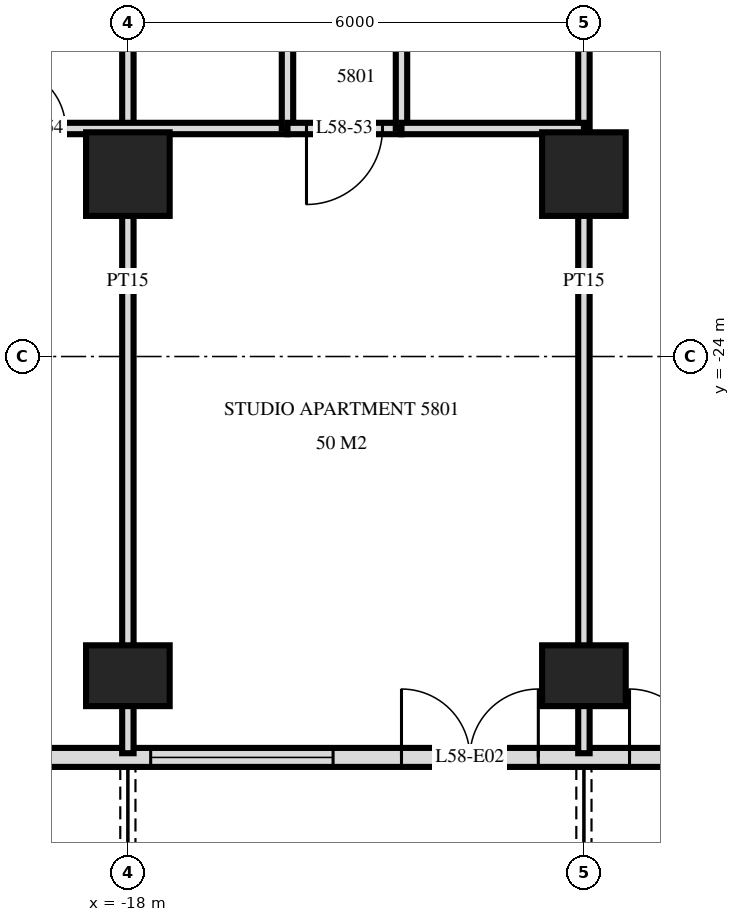
"""IFC4 building model, lengths in metres.
Left out: names, types, materials, properties, quantities, classifications, styles, units other than length and angle.
Written with IfcOpenShell. Run it as: python <this file> out.ifc"""

import sys

from ifc_helpers import new_model, si_unit, direction, frame, frame_2d, origin, origin_2d, place, context, subcontext, project, spatial, rectangle, extrude, element, fill, save


model = new_model("IFC4")
c1 = context("Model", 3, precision=1e-05, world=origin(), true_north=direction((0.0, 1.0)))
c2 = subcontext(c1, "Body", "Model", "MODEL_VIEW")
j1 = project(units=[si_unit("LENGTHUNIT", "METRE"), si_unit("PLANEANGLEUNIT", "RADIAN")], contexts=[c1])
p1 = place(None, origin())
s1 = spatial("IfcSite", under=j1, at=p1, CompositionType="ELEMENT")
p2 = place(p1, origin())
s2 = spatial("IfcBuilding", under=s1, at=p2, CompositionType="ELEMENT")
p3 = place(p2, frame((0.0, 0.0, 222.1)))
s3 = spatial("IfcBuildingStorey", under=s2, at=p3, CompositionType="ELEMENT", Elevation=222.1)
p4 = place(p3, frame((-18.0, -28.2, 0.0), z_axis=(0.0, 0.0, 1.0), x_axis=(1.0, 0.0, 0.0)))
e1 = element("IfcColumn", 1, at=p4, inside=s3, PredefinedType="COLUMN", context=c2, shape_type="SweptSolid", body=[
    extrude(rectangle(XDim=1.1, YDim=0.8, at=origin_2d()), origin(), (0.0, 0.0, 1.0), 3.5),
])
p5 = place(p3, frame((-18.0, -21.6, 0.0), z_axis=(0.0, 0.0, 1.0), x_axis=(1.0, 0.0, 0.0)))
e2 = element("IfcColumn", 2, at=p5, inside=s3, PredefinedType="COLUMN", context=c2, shape_type="SweptSolid", body=[
    extrude(rectangle(XDim=1.1, YDim=1.1, at=origin_2d()), origin(), (0.0, 0.0, 1.0), 3.5),
])
p6 = place(p3, frame((-12.0, -28.2, 0.0), z_axis=(0.0, 0.0, 1.0), x_axis=(1.0, 0.0, 0.0)))
e3 = element("IfcColumn", 3, at=p6, inside=s3, PredefinedType="COLUMN", context=c2, shape_type="SweptSolid", body=[
    extrude(rectangle(XDim=1.1, YDim=0.8, at=origin_2d()), origin(), (0.0, 0.0, 1.0), 3.5),
])
p7 = place(p3, frame((-12.0, -21.6, 0.0), z_axis=(0.0, 0.0, 1.0), x_axis=(1.0, 0.0, 0.0)))
e4 = element("IfcColumn", 4, at=p7, inside=s3, PredefinedType="COLUMN", context=c2, shape_type="SweptSolid", body=[
    extrude(rectangle(XDim=1.1, YDim=1.1, at=origin_2d()), origin(), (0.0, 0.0, 1.0), 3.5),
])
p8 = place(p3, frame((-22.475, -29.275, 0.0), z_axis=(0.0, 0.0, 1.0), x_axis=(1.0, 0.0, 0.0)))
e5 = element("IfcWall", 5, at=p8, inside=s3, PredefinedType="SOLIDWALL", context=c2, shape_type="SweptSolid", body=[
    extrude(rectangle(XDim=44.951, YDim=0.25, at=frame_2d((22.475, 0.0))), origin(), (0.0, 0.0, 1.0), 3.22),
])
p9 = place(p8, frame((0.575, 0.0, 0.0)))
e6 = element("IfcOpeningElement", 6, at=p9, cuts=e5, PredefinedType="OPENING", context=c2, shape_type="SweptSolid", body=[
    extrude(rectangle(XDim=1.8, YDim=2.4, at=frame_2d((0.9, 1.2))), frame((0.0, 0.135, 0.0), z_axis=(0.0, -1.0, 0.0), x_axis=(1.0, 0.0, 0.0)), (0.0, 0.0, 1.0), 0.27),
])
p10 = place(p8, frame((4.775, 0.0, 0.9)))
e7 = element("IfcOpeningElement", 7, at=p10, cuts=e5, PredefinedType="OPENING", context=c2, shape_type="SweptSolid", body=[
    extrude(rectangle(XDim=2.4, YDim=1.5, at=frame_2d((1.2, 0.75))), frame((0.0, 0.135, 0.0), z_axis=(0.0, -1.0, 0.0), x_axis=(1.0, 0.0, 0.0)), (0.0, 0.0, 1.0), 0.27),
])
p11 = place(p8, frame((8.075, 0.0, 0.0)))
e8 = element("IfcOpeningElement", 8, at=p11, cuts=e5, PredefinedType="OPENING", context=c2, shape_type="SweptSolid", body=[
    extrude(rectangle(XDim=1.8, YDim=2.4, at=frame_2d((0.9, 1.2))), frame((0.0, 0.135, 0.0), z_axis=(0.0, -1.0, 0.0), x_axis=(1.0, 0.0, 0.0)), (0.0, 0.0, 1.0), 0.27),
])
p12 = place(p8, frame((11.075, 0.0, 0.0)))
e9 = element("IfcOpeningElement", 9, at=p12, cuts=e5, PredefinedType="OPENING", context=c2, shape_type="SweptSolid", body=[
    extrude(rectangle(XDim=1.8, YDim=2.4, at=frame_2d((0.9, 1.2))), frame((0.0, 0.135, 0.0), z_axis=(0.0, -1.0, 0.0), x_axis=(1.0, 0.0, 0.0)), (0.0, 0.0, 1.0), 0.27),
])
p13 = place(p8, frame((13.775, 0.0, 0.9)))
e10 = element("IfcOpeningElement", 10, at=p13, cuts=e5, PredefinedType="OPENING", context=c2, shape_type="SweptSolid", body=[
    extrude(rectangle(XDim=2.4, YDim=1.5, at=frame_2d((1.2, 0.75))), frame((0.0, 0.135, 0.0), z_axis=(0.0, -1.0, 0.0), x_axis=(1.0, 0.0, 0.0)), (0.0, 0.0, 1.0), 0.27),
])
p14 = place(p8, frame((16.775, 0.0, 0.9)))
e11 = element("IfcOpeningElement", 11, at=p14, cuts=e5, PredefinedType="OPENING", context=c2, shape_type="SweptSolid", body=[
    extrude(rectangle(XDim=2.4, YDim=1.5, at=frame_2d((1.2, 0.75))), frame((0.0, 0.135, 0.0), z_axis=(0.0, -1.0, 0.0), x_axis=(1.0, 0.0, 0.0)), (0.0, 0.0, 1.0), 0.27),
])
p15 = place(p8, frame((20.075, 0.0, 0.0)))
e12 = element("IfcOpeningElement", 12, at=p15, cuts=e5, PredefinedType="OPENING", context=c2, shape_type="SweptSolid", body=[
    extrude(rectangle(XDim=1.8, YDim=2.4, at=frame_2d((0.9, 1.2))), frame((0.0, 0.135, 0.0), z_axis=(0.0, -1.0, 0.0), x_axis=(1.0, 0.0, 0.0)), (0.0, 0.0, 1.0), 0.27),
])
p16 = place(p8, frame((23.075, 0.0, 0.0)))
e13 = element("IfcOpeningElement", 13, at=p16, cuts=e5, PredefinedType="OPENING", context=c2, shape_type="SweptSolid", body=[
    extrude(rectangle(XDim=1.8, YDim=2.4, at=frame_2d((0.9, 1.2))), frame((0.0, 0.135, 0.0), z_axis=(0.0, -1.0, 0.0), x_axis=(1.0, 0.0, 0.0)), (0.0, 0.0, 1.0), 0.27),
])
p17 = place(p8, frame((25.775, 0.0, 0.9)))
e14 = element("IfcOpeningElement", 14, at=p17, cuts=e5, PredefinedType="OPENING", context=c2, shape_type="SweptSolid", body=[
    extrude(rectangle(XDim=2.4, YDim=1.5, at=frame_2d((1.2, 0.75))), frame((0.0, 0.135, 0.0), z_axis=(0.0, -1.0, 0.0), x_axis=(1.0, 0.0, 0.0)), (0.0, 0.0, 1.0), 0.27),
])
p18 = place(p8, frame((29.075, 0.0, 0.0)))
e15 = element("IfcOpeningElement", 15, at=p18, cuts=e5, PredefinedType="OPENING", context=c2, shape_type="SweptSolid", body=[
    extrude(rectangle(XDim=1.8, YDim=2.4, at=frame_2d((0.9, 1.2))), frame((0.0, 0.135, 0.0), z_axis=(0.0, -1.0, 0.0), x_axis=(1.0, 0.0, 0.0)), (0.0, 0.0, 1.0), 0.27),
])
p19 = place(p8, frame((31.775, 0.0, 0.9)))
e16 = element("IfcOpeningElement", 16, at=p19, cuts=e5, PredefinedType="OPENING", context=c2, shape_type="SweptSolid", body=[
    extrude(rectangle(XDim=2.4, YDim=1.5, at=frame_2d((1.2, 0.75))), frame((0.0, 0.135, 0.0), z_axis=(0.0, -1.0, 0.0), x_axis=(1.0, 0.0, 0.0)), (0.0, 0.0, 1.0), 0.27),
])
p20 = place(p8, frame((35.075, 0.0, 0.0)))
e17 = element("IfcOpeningElement", 17, at=p20, cuts=e5, PredefinedType="OPENING", context=c2, shape_type="SweptSolid", body=[
    extrude(rectangle(XDim=1.8, YDim=2.4, at=frame_2d((0.9, 1.2))), frame((0.0, 0.135, 0.0), z_axis=(0.0, -1.0, 0.0), x_axis=(1.0, 0.0, 0.0)), (0.0, 0.0, 1.0), 0.27),
])
p21 = place(p8, frame((41.075, 0.0, 0.0)))
e18 = element("IfcOpeningElement", 18, at=p21, cuts=e5, PredefinedType="OPENING", context=c2, shape_type="SweptSolid", body=[
    extrude(rectangle(XDim=1.8, YDim=2.4, at=frame_2d((0.9, 1.2))), frame((0.0, 0.135, 0.0), z_axis=(0.0, -1.0, 0.0), x_axis=(1.0, 0.0, 0.0)), (0.0, 0.0, 1.0), 0.27),
])
p22 = place(p3, frame((-12.0, -29.22, 0.0), z_axis=(0.0, 0.0, 1.0), x_axis=(0.0, 1.0, 0.0)))
e19 = element("IfcWall", 19, at=p22, inside=s3, PredefinedType="PARTITIONING", context=c2, shape_type="SweptSolid", body=[
    extrude(rectangle(XDim=12.42, YDim=0.15, at=frame_2d((6.21, 0.0))), origin(), (0.0, 0.0, 1.0), 3.22),
])
p23 = place(p3, frame((-14.4, -21.0, 0.0), z_axis=(0.0, 0.0, 1.0), x_axis=(0.0, 1.0, 0.0)))
e20 = element("IfcWall", 20, at=p23, inside=s3, PredefinedType="PARTITIONING", context=c2, shape_type="SweptSolid", body=[
    extrude(rectangle(XDim=4.2, YDim=0.15, at=frame_2d((2.1, 0.0))), origin(), (0.0, 0.0, 1.0), 3.22),
])
p24 = place(p23, frame((1.6, 0.0, 0.0)))
e21 = element("IfcOpeningElement", 21, at=p24, cuts=e20, PredefinedType="OPENING", context=c2, shape_type="SweptSolid", body=[
    extrude(rectangle(XDim=1.0, YDim=2.1, at=frame_2d((0.5, 1.05))), frame((0.0, 0.085, 0.0), z_axis=(0.0, -1.0, 0.0), x_axis=(1.0, 0.0, 0.0)), (0.0, 0.0, 1.0), 0.17),
])
p25 = place(p3, frame((-15.9, -21.0, 0.0), z_axis=(0.0, 0.0, 1.0), x_axis=(0.0, 1.0, 0.0)))
e22 = element("IfcWall", 22, at=p25, inside=s3, PredefinedType="PARTITIONING", context=c2, shape_type="SweptSolid", body=[
    extrude(rectangle(XDim=4.2, YDim=0.15, at=frame_2d((2.1, 0.0))), origin(), (0.0, 0.0, 1.0), 3.22),
])
p26 = place(p25, frame((1.6, 0.0, 0.0)))
e23 = element("IfcOpeningElement", 23, at=p26, cuts=e22, PredefinedType="OPENING", context=c2, shape_type="SweptSolid", body=[
    extrude(rectangle(XDim=1.0, YDim=2.1, at=frame_2d((0.5, 1.05))), frame((0.0, 0.085, 0.0), z_axis=(0.0, -1.0, 0.0), x_axis=(1.0, 0.0, 0.0)), (0.0, 0.0, 1.0), 0.17),
])
p27 = place(p3, frame((-18.0, -29.22, 0.0), z_axis=(0.0, 0.0, 1.0), x_axis=(0.0, 1.0, 0.0)))
e24 = element("IfcWall", 24, at=p27, inside=s3, PredefinedType="PARTITIONING", context=c2, shape_type="SweptSolid", body=[
    extrude(rectangle(XDim=12.42, YDim=0.15, at=frame_2d((6.21, 0.0))), origin(), (0.0, 0.0, 1.0), 3.22),
])
p28 = place(p3, frame((-15.9, -21.0, 0.0), z_axis=(0.0, 0.0, 1.0), x_axis=(1.0, 0.0, 0.0)))
e25 = element("IfcWall", 25, at=p28, inside=s3, PredefinedType="PARTITIONING", context=c2, shape_type="SweptSolid", body=[
    extrude(rectangle(XDim=1.5, YDim=0.15, at=frame_2d((0.75, 0.0))), origin(), (0.0, 0.0, 1.0), 3.22),
])
p29 = place(p28, frame((0.25, 0.0, 0.0)))
e26 = element("IfcOpeningElement", 26, at=p29, cuts=e25, PredefinedType="OPENING", context=c2, shape_type="SweptSolid", body=[
    extrude(rectangle(XDim=1.0, YDim=2.1, at=frame_2d((0.5, 1.05))), frame((0.0, 0.085, 0.0), z_axis=(0.0, -1.0, 0.0), x_axis=(1.0, 0.0, 0.0)), (0.0, 0.0, 1.0), 0.17),
])
p30 = place(p3, frame((-22.2, -21.0, 0.0), z_axis=(0.0, 0.0, 1.0), x_axis=(1.0, 0.0, 0.0)))
e27 = element("IfcWall", 27, at=p30, inside=s3, PredefinedType="PARTITIONING", context=c2, shape_type="SweptSolid", body=[
    extrude(rectangle(XDim=6.3, YDim=0.15, at=frame_2d((3.15, 0.0))), origin(), (0.0, 0.0, 1.0), 3.22),
])
p31 = place(p30, frame((2.58, 0.0, 0.0)))
e28 = element("IfcOpeningElement", 28, at=p31, cuts=e27, PredefinedType="OPENING", context=c2, shape_type="SweptSolid", body=[
    extrude(rectangle(XDim=0.8, YDim=2.1, at=frame_2d((0.4, 1.05))), frame((0.0, 0.085, 0.0), z_axis=(0.0, -1.0, 0.0), x_axis=(1.0, 0.0, 0.0)), (0.0, 0.0, 1.0), 0.17),
])
p32 = place(p3, frame((-14.4, -21.0, 0.0), z_axis=(0.0, 0.0, 1.0), x_axis=(1.0, 0.0, 0.0)))
e29 = element("IfcWall", 29, at=p32, inside=s3, PredefinedType="PARTITIONING", context=c2, shape_type="SweptSolid", body=[
    extrude(rectangle(XDim=2.4, YDim=0.15, at=frame_2d((1.2, 0.0))), origin(), (0.0, 0.0, 1.0), 3.22),
])
p33 = place(p10, origin())
e30 = element("IfcWindow", 30, at=p33, inside=s3, PartitioningType="SINGLE_PANEL", PredefinedType="WINDOW", context=c2, shape_type="SweptSolid", body=[
    extrude(rectangle(XDim=2.4, YDim=1.5, at=frame_2d((1.2, 0.75))), frame((0.0, 0.03, 0.0), z_axis=(0.0, -1.0, 0.0), x_axis=(1.0, 0.0, 0.0)), (0.0, 0.0, 1.0), 0.06),
])
fill(e7, e30)
p34 = place(p11, origin())
e31 = element("IfcDoor", 31, at=p34, inside=s3, OperationType="DOUBLE_DOOR_SINGLE_SWING", PredefinedType="DOOR", context=c2, shape_type="SweptSolid", body=[
    extrude(rectangle(XDim=1.8, YDim=2.4, at=frame_2d((0.9, 1.2))), frame((0.0, 0.025, 0.0), z_axis=(0.0, -1.0, 0.0), x_axis=(1.0, 0.0, 0.0)), (0.0, 0.0, 1.0), 0.05),
])
fill(e8, e31)
p35 = place(p12, origin())
e32 = element("IfcDoor", 32, at=p35, inside=s3, OperationType="DOUBLE_DOOR_SINGLE_SWING", PredefinedType="DOOR", context=c2, shape_type="SweptSolid", body=[
    extrude(rectangle(XDim=1.8, YDim=2.4, at=frame_2d((0.9, 1.2))), frame((0.0, 0.025, 0.0), z_axis=(0.0, -1.0, 0.0), x_axis=(1.0, 0.0, 0.0)), (0.0, 0.0, 1.0), 0.05),
])
fill(e9, e32)
p36 = place(p29, frame((0.5, 0.0, 0.0), z_axis=(0.0, 0.0, 1.0), x_axis=(-1.0, 0.0, 0.0)))
e33 = element("IfcDoor", 33, at=p36, inside=s3, OperationType="SINGLE_SWING_LEFT", PredefinedType="DOOR", context=c2, shape_type="SweptSolid", body=[
    extrude(rectangle(XDim=1.0, YDim=2.1, at=frame_2d((0.0, 1.05))), frame((0.0, -0.025, 0.0), z_axis=(0.0, 1.0, 0.0), x_axis=(-1.0, 0.0, 0.0)), (0.0, 0.0, 1.0), 0.05),
])
fill(e26, e33)
p37 = place(p31, origin())
e34 = element("IfcDoor", 34, at=p37, inside=s3, OperationType="SINGLE_SWING_RIGHT", PredefinedType="DOOR", context=c2, shape_type="SweptSolid", body=[
    extrude(rectangle(XDim=0.8, YDim=2.1, at=frame_2d((0.4, 1.05))), frame((0.0, 0.025, 0.0), z_axis=(0.0, -1.0, 0.0), x_axis=(1.0, 0.0, 0.0)), (0.0, 0.0, 1.0), 0.05),
])
fill(e28, e34)
save(model, sys.argv[1])
